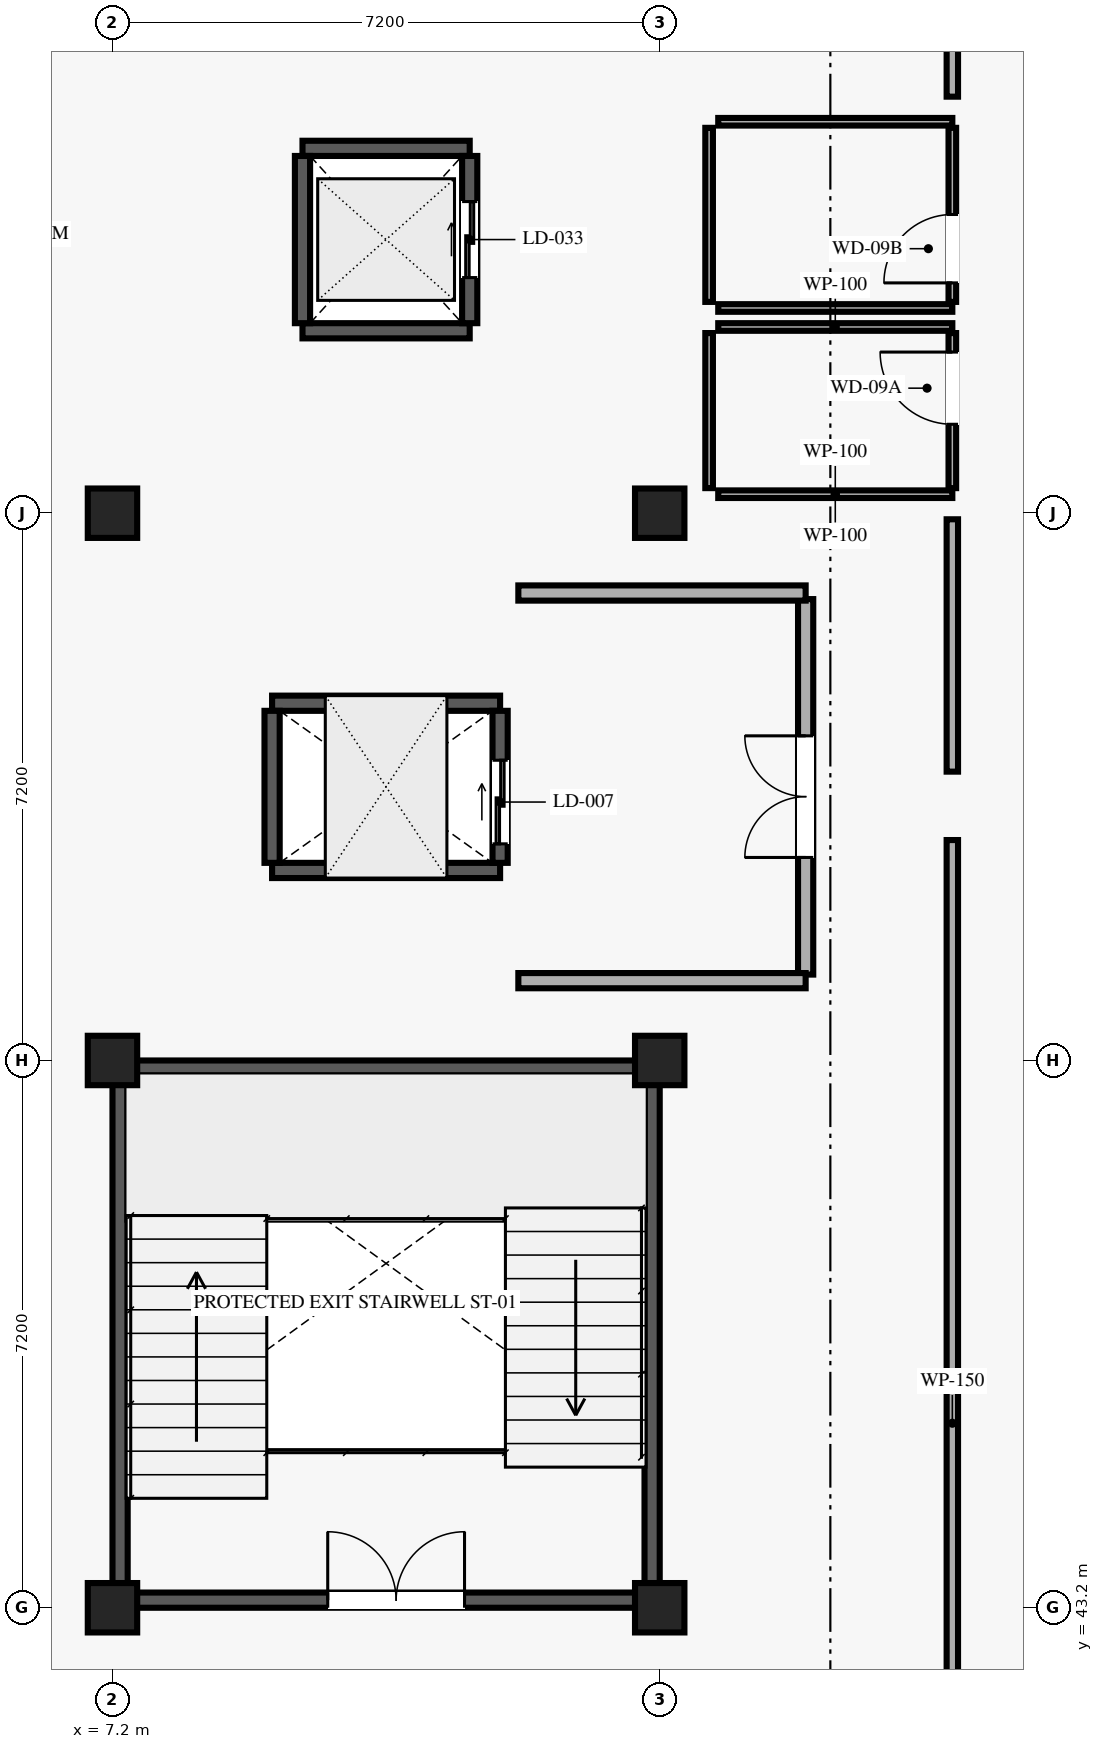
"""IFC4 building model, lengths in metres.
Left out: names, types, materials, properties, quantities, classifications, styles, units other than length and angle.
Written with IfcOpenShell. Run it as: python <this file> out.ifc"""

import sys

from ifc_helpers import new_model, si_unit, direction, frame, frame_2d, origin, origin_2d, place, context, subcontext, project, spatial, rectangle, extrude, element, fill, save


model = new_model("IFC4")
c1 = context("Model", 3, precision=1e-05, world=origin(), true_north=direction((0.0, 1.0)))
c2 = subcontext(c1, "Body", "Model", "MODEL_VIEW")
j1 = project(units=[si_unit("LENGTHUNIT", "METRE"), si_unit("PLANEANGLEUNIT", "RADIAN")], contexts=[c1])
p1 = place(None, origin())
s1 = spatial("IfcSite", under=j1, at=p1, CompositionType="ELEMENT")
p2 = place(p1, origin())
s2 = spatial("IfcBuilding", under=s1, at=p2, CompositionType="ELEMENT")
p3 = place(p2, frame((0.0, 0.0, 21.6)))
s3 = spatial("IfcBuildingStorey", under=s2, at=p3, CompositionType="ELEMENT", Elevation=21.6)
for number, where, z_axis, x_axis in (
    (1, (7.2, 43.2, 0.0), (0.0, 0.0, 1.0), (1.0, 0.0, 0.0)),
    (2, (7.2, 50.4, 0.0), (0.0, 0.0, 1.0), (1.0, 0.0, 0.0)),
    (3, (7.2, 57.6, 0.0), (0.0, 0.0, 1.0), (1.0, 0.0, 0.0)),
    (4, (14.4, 43.2, 0.0), (0.0, 0.0, 1.0), (1.0, 0.0, 0.0)),
    (5, (14.4, 50.4, 0.0), (0.0, 0.0, 1.0), (1.0, 0.0, 0.0)),
    (6, (14.4, 57.6, 0.0), (0.0, 0.0, 1.0), (1.0, 0.0, 0.0)),
):
    element("IfcColumn", number, at=place(p3, frame(where, z_axis=z_axis, x_axis=x_axis)), inside=s3, PredefinedType="COLUMN", context=c2, shape_type="SweptSolid", body=[
        extrude(rectangle(XDim=0.65, YDim=0.65, at=origin_2d()), origin(), (0.0, 0.0, 1.0), 4.05),
    ])
p4 = place(p3, frame((7.4, 43.3, 0.0), z_axis=(0.0, 0.0, 1.0), x_axis=(1.0, 0.0, 0.0)))
e7 = element("IfcWall", 7, at=p4, inside=s3, PredefinedType="SHEAR", context=c2, shape_type="SweptSolid", body=[
    extrude(rectangle(XDim=6.8, YDim=0.2, at=frame_2d((3.4, 0.0))), origin(), (0.0, 0.0, 1.0), 3.83),
])
p5 = place(p4, frame((2.632, 0.0, 0.0)))
e8 = element("IfcOpeningElement", 8, at=p5, cuts=e7, PredefinedType="OPENING", context=c2, shape_type="SweptSolid", body=[
    extrude(rectangle(XDim=1.8, YDim=2.2, at=frame_2d((0.9, 1.1))), frame((0.0, 0.11, 0.0), z_axis=(0.0, -1.0, 0.0), x_axis=(1.0, 0.0, 0.0)), (0.0, 0.0, 1.0), 0.22),
])
for number, where, z_axis, x_axis in (
    (9, (7.4, 50.3, 0.0), (0.0, 0.0, 1.0), (1.0, 0.0, 0.0)),
    (10, (7.3, 43.4, 0.0), (0.0, 0.0, 1.0), (0.0, 1.0, 0.0)),
    (11, (14.3, 43.4, 0.0), (0.0, 0.0, 1.0), (0.0, 1.0, 0.0)),
):
    element("IfcWall", number, at=place(p3, frame(where, z_axis=z_axis, x_axis=x_axis)), inside=s3, PredefinedType="SHEAR", context=c2, shape_type="SweptSolid", body=[
        extrude(rectangle(XDim=6.8, YDim=0.2, at=frame_2d((3.4, 0.0))), origin(), (0.0, 0.0, 1.0), 3.83),
    ])
for number, where, z_axis, x_axis in (
    (12, (9.3, 52.9, 0.0), (0.0, 0.0, 1.0), (1.0, 0.0, 0.0)),
    (13, (9.3, 55.1, 0.0), (0.0, 0.0, 1.0), (1.0, 0.0, 0.0)),
):
    element("IfcWall", number, at=place(p3, frame(where, z_axis=z_axis, x_axis=x_axis)), inside=s3, PredefinedType="SHEAR", context=c2, shape_type="SweptSolid", body=[
        extrude(rectangle(XDim=3.0, YDim=0.2, at=frame_2d((1.5, 0.0))), origin(), (0.0, 0.0, 1.0), 3.83),
    ])
p6 = place(p3, frame((9.3, 53.0, 0.0), z_axis=(0.0, 0.0, 1.0), x_axis=(0.0, 1.0, 0.0)))
e14 = element("IfcWall", 14, at=p6, inside=s3, PredefinedType="SHEAR", context=c2, shape_type="SweptSolid", body=[
    extrude(rectangle(XDim=2.0, YDim=0.2, at=frame_2d((1.0, 0.0))), origin(), (0.0, 0.0, 1.0), 3.83),
])
p7 = place(p3, frame((12.3, 53.0, 0.0), z_axis=(0.0, 0.0, 1.0), x_axis=(0.0, 1.0, 0.0)))
e15 = element("IfcWall", 15, at=p7, inside=s3, PredefinedType="SHEAR", context=c2, shape_type="SweptSolid", body=[
    extrude(rectangle(XDim=2.0, YDim=0.2, at=frame_2d((1.0, 0.0))), origin(), (0.0, 0.0, 1.0), 3.83),
])
p8 = place(p7, frame((0.25, 0.0, 0.0)))
e16 = element("IfcOpeningElement", 16, at=p8, cuts=e15, PredefinedType="OPENING", context=c2, shape_type="SweptSolid", body=[
    extrude(rectangle(XDim=1.1, YDim=2.15, at=frame_2d((0.55, 1.075))), frame((0.0, 0.11, 0.0), z_axis=(0.0, -1.0, 0.0), x_axis=(1.0, 0.0, 0.0)), (0.0, 0.0, 1.0), 0.22),
])
for number, where, z_axis, x_axis in (
    (17, (9.7, 60.0, 0.0), (0.0, 0.0, 1.0), (1.0, 0.0, 0.0)),
    (18, (9.7, 62.4, 0.0), (0.0, 0.0, 1.0), (1.0, 0.0, 0.0)),
    (19, (9.7, 60.1, 0.0), (0.0, 0.0, 1.0), (0.0, 1.0, 0.0)),
):
    element("IfcWall", number, at=place(p3, frame(where, z_axis=z_axis, x_axis=x_axis)), inside=s3, PredefinedType="SHEAR", context=c2, shape_type="SweptSolid", body=[
        extrude(rectangle(XDim=2.2, YDim=0.2, at=frame_2d((1.1, 0.0))), origin(), (0.0, 0.0, 1.0), 3.83),
    ])
p9 = place(p3, frame((11.9, 60.1, 0.0), z_axis=(0.0, 0.0, 1.0), x_axis=(0.0, 1.0, 0.0)))
e20 = element("IfcWall", 20, at=p9, inside=s3, PredefinedType="SHEAR", context=c2, shape_type="SweptSolid", body=[
    extrude(rectangle(XDim=2.2, YDim=0.2, at=frame_2d((1.1, 0.0))), origin(), (0.0, 0.0, 1.0), 3.83),
])
p10 = place(p9, frame((0.6, 0.0, 0.0)))
e21 = element("IfcOpeningElement", 21, at=p10, cuts=e20, PredefinedType="OPENING", context=c2, shape_type="SweptSolid", body=[
    extrude(rectangle(XDim=1.0, YDim=2.1, at=frame_2d((0.5, 1.05))), frame((0.0, 0.11, 0.0), z_axis=(0.0, -1.0, 0.0), x_axis=(1.0, 0.0, 0.0)), (0.0, 0.0, 1.0), 0.22),
])
p11 = place(p3, frame((16.32, 51.53, 0.0), z_axis=(0.0, 0.0, 1.0), x_axis=(0.0, 1.0, 0.0)))
e22 = element("IfcWall", 22, at=p11, inside=s3, PredefinedType="SOLIDWALL", context=c2, shape_type="SweptSolid", body=[
    extrude(rectangle(XDim=4.94, YDim=0.2, at=frame_2d((2.47, 0.0))), origin(), (0.0, 0.0, 1.0), 3.83),
])
p12 = place(p11, frame((1.541, 0.0, 0.0)))
e23 = element("IfcOpeningElement", 23, at=p12, cuts=e22, PredefinedType="OPENING", context=c2, shape_type="SweptSolid", body=[
    extrude(rectangle(XDim=1.6, YDim=2.2, at=frame_2d((0.8, 1.1))), frame((0.0, 0.11, 0.0), z_axis=(0.0, -1.0, 0.0), x_axis=(1.0, 0.0, 0.0)), (0.0, 0.0, 1.0), 0.22),
])
for number, where, z_axis, x_axis in (
    (24, (12.54, 51.45, 0.0), (0.0, 0.0, 1.0), (1.0, 0.0, 0.0)),
    (25, (12.54, 56.55, 0.0), (0.0, 0.0, 1.0), (1.0, 0.0, 0.0)),
):
    element("IfcWall", number, at=place(p3, frame(where, z_axis=z_axis, x_axis=x_axis)), inside=s3, PredefinedType="SOLIDWALL", context=c2, shape_type="SweptSolid", body=[
        extrude(rectangle(XDim=3.78, YDim=0.2, at=frame_2d((1.89, 0.0))), origin(), (0.0, 0.0, 1.0), 3.83),
    ])
p13 = place(p3, frame((18.25, 57.93, 0.0), z_axis=(0.0, 0.0, 1.0), x_axis=(0.0, 1.0, 0.0)))
e26 = element("IfcWall", 26, at=p13, inside=s3, PredefinedType="PARTITIONING", context=c2, shape_type="SweptSolid", body=[
    extrude(rectangle(XDim=2.04, YDim=0.1, at=frame_2d((1.02, 0.0))), origin(), (0.0, 0.0, 1.0), 3.83),
])
p14 = place(p13, frame((0.84, 0.0, 0.0)))
e27 = element("IfcOpeningElement", 27, at=p14, cuts=e26, PredefinedType="OPENING", context=c2, shape_type="SweptSolid", body=[
    extrude(rectangle(XDim=0.95, YDim=2.1, at=frame_2d((0.475, 1.05))), frame((0.0, 0.06, 0.0), z_axis=(0.0, -1.0, 0.0), x_axis=(1.0, 0.0, 0.0)), (0.0, 0.0, 1.0), 0.12),
])
p15 = place(p3, frame((15.17, 57.85, 0.0), z_axis=(0.0, 0.0, 1.0), x_axis=(1.0, 0.0, 0.0)))
e28 = element("IfcWall", 28, at=p15, inside=s3, PredefinedType="PARTITIONING", context=c2, shape_type="SweptSolid", body=[
    extrude(rectangle(XDim=3.08, YDim=0.1, at=frame_2d((1.54, 0.0))), origin(), (0.0, 0.0, 1.0), 3.27),
])
p16 = place(p3, frame((15.17, 60.05, 0.0), z_axis=(0.0, 0.0, 1.0), x_axis=(1.0, 0.0, 0.0)))
e29 = element("IfcWall", 29, at=p16, inside=s3, PredefinedType="PARTITIONING", context=c2, shape_type="SweptSolid", body=[
    extrude(rectangle(XDim=3.08, YDim=0.1, at=frame_2d((1.54, 0.0))), origin(), (0.0, 0.0, 1.0), 3.83),
])
p17 = place(p3, frame((15.05, 57.93, 0.0), z_axis=(0.0, 0.0, 1.0), x_axis=(0.0, 1.0, 0.0)))
e30 = element("IfcWall", 30, at=p17, inside=s3, PredefinedType="PARTITIONING", context=c2, shape_type="SweptSolid", body=[
    extrude(rectangle(XDim=2.04, YDim=0.1, at=frame_2d((1.02, 0.0))), origin(), (0.0, 0.0, 1.0), 3.83),
])
p18 = place(p3, frame((18.25, 60.38, 0.0), z_axis=(0.0, 0.0, 1.0), x_axis=(0.0, 1.0, 0.0)))
e31 = element("IfcWall", 31, at=p18, inside=s3, PredefinedType="PARTITIONING", context=c2, shape_type="SweptSolid", body=[
    extrude(rectangle(XDim=2.29, YDim=0.1, at=frame_2d((1.145, 0.0))), origin(), (0.0, 0.0, 1.0), 3.83),
])
p19 = place(p18, frame((0.25, 0.0, 0.0)))
e32 = element("IfcOpeningElement", 32, at=p19, cuts=e31, PredefinedType="OPENING", context=c2, shape_type="SweptSolid", body=[
    extrude(rectangle(XDim=0.9, YDim=2.1, at=frame_2d((0.45, 1.05))), frame((0.0, 0.06, 0.0), z_axis=(0.0, -1.0, 0.0), x_axis=(1.0, 0.0, 0.0)), (0.0, 0.0, 1.0), 0.12),
])
for number, where, z_axis, x_axis in (
    (33, (15.17, 60.3, 0.0), (0.0, 0.0, 1.0), (1.0, 0.0, 0.0)),
    (34, (15.17, 62.75, 0.0), (0.0, 0.0, 1.0), (1.0, 0.0, 0.0)),
):
    element("IfcWall", number, at=place(p3, frame(where, z_axis=z_axis, x_axis=x_axis)), inside=s3, PredefinedType="PARTITIONING", context=c2, shape_type="SweptSolid", body=[
        extrude(rectangle(XDim=3.08, YDim=0.1, at=frame_2d((1.54, 0.0))), origin(), (0.0, 0.0, 1.0), 3.83),
    ])
p20 = place(p3, frame((15.05, 60.38, 0.0), z_axis=(0.0, 0.0, 1.0), x_axis=(0.0, 1.0, 0.0)))
e35 = element("IfcWall", 35, at=p20, inside=s3, PredefinedType="PARTITIONING", context=c2, shape_type="SweptSolid", body=[
    extrude(rectangle(XDim=2.29, YDim=0.1, at=frame_2d((1.145, 0.0))), origin(), (0.0, 0.0, 1.0), 3.83),
])
p21 = place(p3, frame((18.25, 36.55, 0.0), z_axis=(0.0, 0.0, 1.0), x_axis=(0.0, 1.0, 0.0)))
e36 = element("IfcWall", 36, at=p21, inside=s3, PredefinedType="PARTITIONING", context=c2, shape_type="SweptSolid", body=[
    extrude(rectangle(XDim=16.75, YDim=0.15, at=frame_2d((8.375, 0.0))), origin(), (0.0, 0.0, 1.0), 3.83),
])
p22 = place(p21, frame((2.53, 0.0, 0.0)))
e37 = element("IfcOpeningElement", 37, at=p22, cuts=e36, PredefinedType="OPENING", context=c2, shape_type="SweptSolid", body=[
    extrude(rectangle(XDim=1.05, YDim=2.15, at=frame_2d((0.525, 1.075))), frame((0.0, 0.085, 0.0), z_axis=(0.0, -1.0, 0.0), x_axis=(1.0, 0.0, 0.0)), (0.0, 0.0, 1.0), 0.17),
])
p23 = place(p3, frame((18.25, 63.08, 0.0), z_axis=(0.0, 0.0, 1.0), x_axis=(0.0, 1.0, 0.0)))
e38 = element("IfcWall", 38, at=p23, inside=s3, PredefinedType="PARTITIONING", context=c2, shape_type="SweptSolid", body=[
    extrude(rectangle(XDim=8.62, YDim=0.15, at=frame_2d((4.31, 0.0))), origin(), (0.0, 0.0, 1.0), 3.83),
])
p24 = place(p23, frame((4.263, 0.0, 0.0)))
e39 = element("IfcOpeningElement", 39, at=p24, cuts=e38, PredefinedType="OPENING", context=c2, shape_type="SweptSolid", body=[
    extrude(rectangle(XDim=2.1, YDim=2.4, at=frame_2d((1.05, 1.2))), frame((0.0, 0.085, 0.0), z_axis=(0.0, -1.0, 0.0), x_axis=(1.0, 0.0, 0.0)), (0.0, 0.0, 1.0), 0.17),
])
p25 = place(p3, frame((18.25, 54.2, 0.0), z_axis=(0.0, 0.0, 1.0), x_axis=(0.0, 1.0, 0.0)))
e40 = element("IfcWall", 40, at=p25, inside=s3, PredefinedType="PARTITIONING", context=c2, shape_type="SweptSolid", body=[
    extrude(rectangle(XDim=3.32, YDim=0.15, at=frame_2d((1.66, 0.0))), origin(), (0.0, 0.0, 1.0), 3.83),
])
p26 = place(p5, origin())
e41 = element("IfcDoor", 41, at=p26, inside=s3, OperationType="DOUBLE_DOOR_SINGLE_SWING", PredefinedType="DOOR", context=c2, shape_type="SweptSolid", body=[
    extrude(rectangle(XDim=1.8, YDim=2.2, at=frame_2d((0.9, 1.1))), frame((0.0, 0.025, 0.0), z_axis=(0.0, -1.0, 0.0), x_axis=(1.0, 0.0, 0.0)), (0.0, 0.0, 1.0), 0.05),
])
fill(e8, e41)
p27 = place(p8, origin())
e42 = element("IfcDoor", 42, at=p27, inside=s3, OperationType="DOUBLE_DOOR_SLIDING", PredefinedType="DOOR", context=c2, shape_type="SweptSolid", body=[
    extrude(rectangle(XDim=1.1, YDim=2.15, at=frame_2d((0.55, 1.075))), frame((0.0, 0.025, 0.0), z_axis=(0.0, -1.0, 0.0), x_axis=(1.0, 0.0, 0.0)), (0.0, 0.0, 1.0), 0.05),
])
fill(e16, e42)
p28 = place(p10, origin())
e43 = element("IfcDoor", 43, at=p28, inside=s3, OperationType="DOUBLE_DOOR_SLIDING", PredefinedType="DOOR", context=c2, shape_type="SweptSolid", body=[
    extrude(rectangle(XDim=1.0, YDim=2.1, at=frame_2d((0.5, 1.05))), frame((0.0, 0.025, 0.0), z_axis=(0.0, -1.0, 0.0), x_axis=(1.0, 0.0, 0.0)), (0.0, 0.0, 1.0), 0.05),
])
fill(e21, e43)
p29 = place(p12, origin())
e44 = element("IfcDoor", 44, at=p29, inside=s3, OperationType="DOUBLE_DOOR_SINGLE_SWING", PredefinedType="DOOR", context=c2, shape_type="SweptSolid", body=[
    extrude(rectangle(XDim=1.6, YDim=2.2, at=frame_2d((0.8, 1.1))), frame((0.0, 0.025, 0.0), z_axis=(0.0, -1.0, 0.0), x_axis=(1.0, 0.0, 0.0)), (0.0, 0.0, 1.0), 0.05),
])
fill(e23, e44)
p30 = place(p14, origin())
e45 = element("IfcDoor", 45, at=p30, inside=s3, OperationType="SINGLE_SWING_RIGHT", PredefinedType="DOOR", context=c2, shape_type="SweptSolid", body=[
    extrude(rectangle(XDim=0.95, YDim=2.1, at=frame_2d((0.475, 1.05))), frame((0.0, 0.025, 0.0), z_axis=(0.0, -1.0, 0.0), x_axis=(1.0, 0.0, 0.0)), (0.0, 0.0, 1.0), 0.05),
])
fill(e27, e45)
p31 = place(p19, origin())
e46 = element("IfcDoor", 46, at=p31, inside=s3, OperationType="SINGLE_SWING_LEFT", PredefinedType="DOOR", context=c2, shape_type="SweptSolid", body=[
    extrude(rectangle(XDim=0.9, YDim=2.1, at=frame_2d((0.45, 1.05))), frame((0.0, 0.025, 0.0), z_axis=(0.0, -1.0, 0.0), x_axis=(1.0, 0.0, 0.0)), (0.0, 0.0, 1.0), 0.05),
])
fill(e32, e46)
save(model, sys.argv[1])
